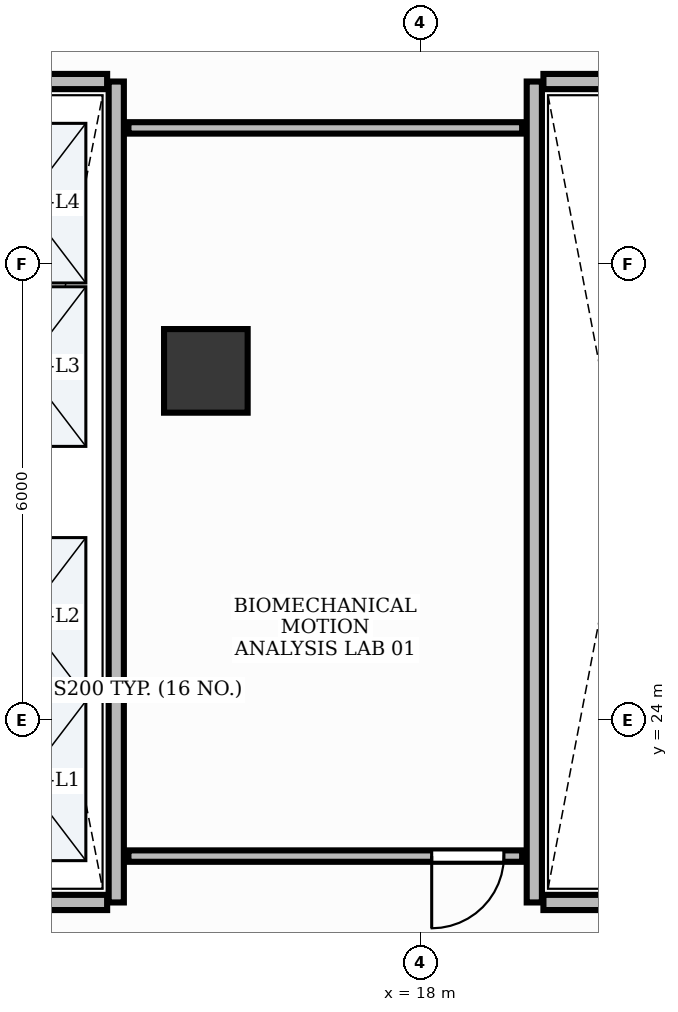
"""IFC4 building model, lengths in metres.
Left out: names, types, materials, properties, quantities, classifications, styles, units other than length and angle.
Written with IfcOpenShell. Run it as: python <this file> out.ifc"""

import sys

from ifc_helpers import new_model, si_unit, direction, frame, frame_2d, origin, origin_2d, place, context, subcontext, project, spatial, rectangle, extrude, element, fill, save


model = new_model("IFC4")
c1 = context("Model", 3, precision=1e-05, world=origin(), true_north=direction((0.0, 1.0)))
c2 = subcontext(c1, "Body", "Model", "MODEL_VIEW")
j1 = project(units=[si_unit("LENGTHUNIT", "METRE"), si_unit("PLANEANGLEUNIT", "RADIAN")], contexts=[c1])
p1 = place(None, origin())
s1 = spatial("IfcSite", under=j1, at=p1, CompositionType="ELEMENT")
p2 = place(p1, origin())
s2 = spatial("IfcBuilding", under=s1, at=p2, CompositionType="ELEMENT")
p3 = place(p2, frame((0.0, 0.0, 76.2)))
s3 = spatial("IfcBuildingStorey", under=s2, at=p3, CompositionType="ELEMENT", Elevation=76.2)
p4 = place(p3, frame((15.179, 28.594, -0.0), z_axis=(0.0, 0.0, 1.0), x_axis=(1.0, 0.0, 0.0)))
e1 = element("IfcColumn", 1, at=p4, inside=s3, PredefinedType="COLUMN", context=c2, shape_type="SweptSolid", body=[
    extrude(rectangle(XDim=1.1, YDim=1.1, at=origin_2d()), origin(), (0.0, 0.0, 1.0), 3.901),
])
p5 = place(p3, frame((14.0, 21.6, 0.0), z_axis=(0.0, 0.0, 1.0), x_axis=(0.0, 1.0, 0.0)))
e2 = element("IfcWall", 2, at=p5, inside=s3, PredefinedType="PARTITIONING", context=c2, shape_type="SweptSolid", body=[
    extrude(rectangle(XDim=10.8, YDim=0.2, at=frame_2d((5.4, 0.0))), origin(), (0.0, 0.0, 1.0), 2.91),
])
for number, where, z_axis, x_axis in (
    (3, (11.72, 21.6, 0.0), (0.0, 0.0, 1.0), (1.0, 0.0, 0.0)),
    (4, (11.72, 32.4, 0.0), (0.0, 0.0, 1.0), (1.0, 0.0, 0.0)),
):
    element("IfcWall", number, at=place(p3, frame(where, z_axis=z_axis, x_axis=x_axis)), inside=s3, PredefinedType="PARTITIONING", context=c2, shape_type="SweptSolid", body=[
        extrude(rectangle(XDim=2.16, YDim=0.2, at=frame_2d((1.08, 0.0))), origin(), (0.0, 0.0, 1.0), 2.91),
    ])
p6 = place(p3, frame((19.5, 21.6, 0.0), z_axis=(0.0, 0.0, 1.0), x_axis=(0.0, 1.0, 0.0)))
e5 = element("IfcWall", 5, at=p6, inside=s3, PredefinedType="PARTITIONING", context=c2, shape_type="SweptSolid", body=[
    extrude(rectangle(XDim=10.8, YDim=0.2, at=frame_2d((5.4, 0.0))), origin(), (0.0, 0.0, 1.0), 2.91),
])
for number, where, z_axis, x_axis in (
    (6, (19.62, 21.6, 0.0), (0.0, 0.0, 1.0), (1.0, 0.0, 0.0)),
    (7, (19.62, 32.4, 0.0), (0.0, 0.0, 1.0), (1.0, 0.0, 0.0)),
):
    element("IfcWall", number, at=place(p3, frame(where, z_axis=z_axis, x_axis=x_axis)), inside=s3, PredefinedType="PARTITIONING", context=c2, shape_type="SweptSolid", body=[
        extrude(rectangle(XDim=2.11, YDim=0.2, at=frame_2d((1.055, 0.0))), origin(), (0.0, 0.0, 1.0), 2.91),
    ])
p7 = place(p3, frame((19.34, 22.21, 0.0), z_axis=(0.0, 0.0, 1.0), x_axis=(-1.0, 0.0, 0.0)))
e8 = element("IfcWall", 8, at=p7, inside=s3, PredefinedType="PARTITIONING", context=c2, shape_type="SweptSolid", body=[
    extrude(rectangle(XDim=5.18, YDim=0.15, at=frame_2d((2.59, 0.0))), origin(), (0.0, 0.0, 1.0), 2.91),
])
p8 = place(p7, frame((0.24, 0.0, 0.0)))
e9 = element("IfcOpeningElement", 9, at=p8, cuts=e8, PredefinedType="OPENING", context=c2, shape_type="SweptSolid", body=[
    extrude(rectangle(XDim=0.95, YDim=2.15, at=frame_2d((0.475, 1.075))), frame((0.0, 0.09, 0.0), z_axis=(0.0, -1.0, 0.0), x_axis=(1.0, 0.0, 0.0)), (0.0, 0.0, 1.0), 0.18),
])
p9 = place(p3, frame((14.16, 31.79, 0.0), z_axis=(0.0, 0.0, 1.0), x_axis=(1.0, 0.0, 0.0)))
e10 = element("IfcWall", 10, at=p9, inside=s3, PredefinedType="PARTITIONING", context=c2, shape_type="SweptSolid", body=[
    extrude(rectangle(XDim=5.18, YDim=0.15, at=frame_2d((2.59, 0.0))), origin(), (0.0, 0.0, 1.0), 2.91),
])
p10 = place(p8, origin())
e11 = element("IfcDoor", 11, at=p10, inside=s3, OperationType="SINGLE_SWING_RIGHT", PredefinedType="DOOR", context=c2, shape_type="SweptSolid", body=[
    extrude(rectangle(XDim=0.95, YDim=2.15, at=frame_2d((0.475, 1.075))), frame((0.0, 0.025, 0.0), z_axis=(0.0, -1.0, 0.0), x_axis=(1.0, 0.0, 0.0)), (0.0, 0.0, 1.0), 0.05),
])
fill(e9, e11)
save(model, sys.argv[1])
